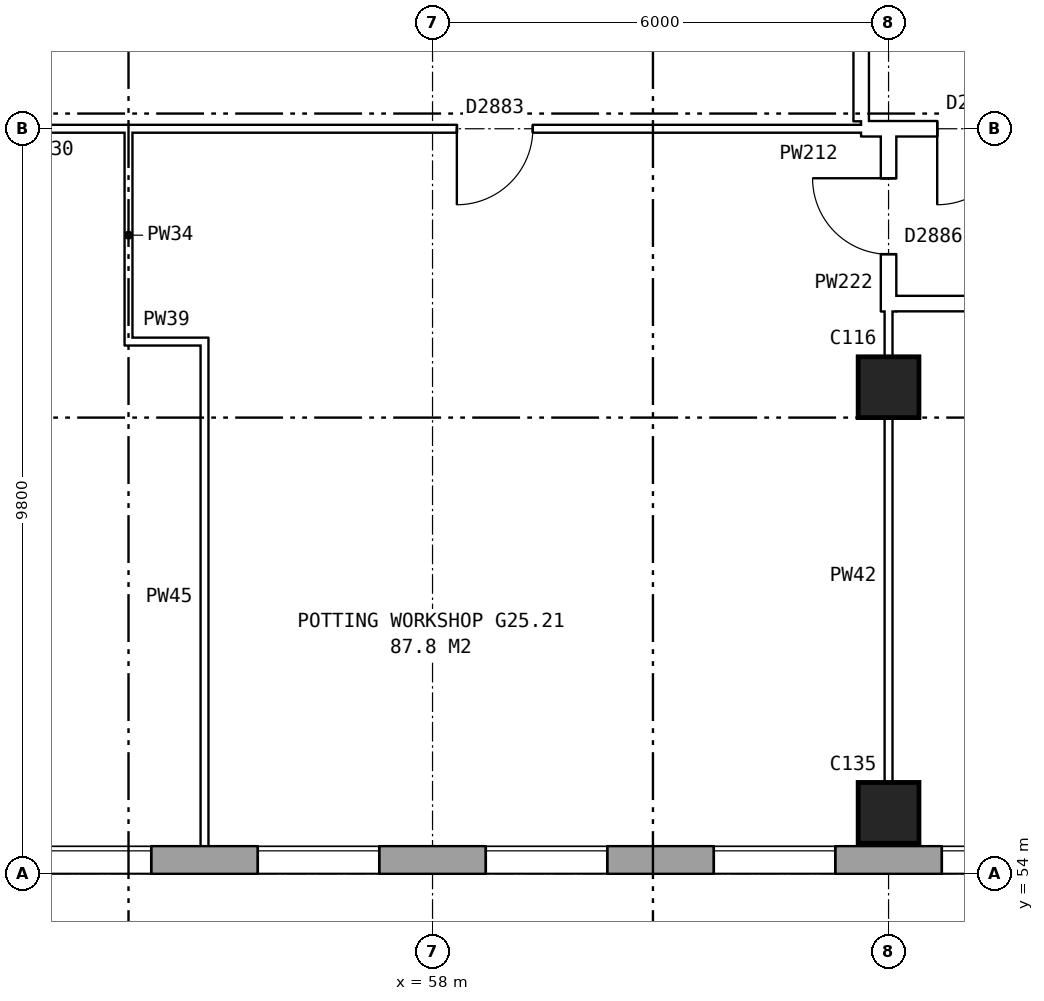
"""IFC4 building model, lengths in metres.
Left out: names, types, materials, properties, quantities, classifications, styles, units other than length and angle.
Written with IfcOpenShell. Run it as: python <this file> out.ifc"""

import sys

from ifc_helpers import new_model, si_unit, direction, frame, frame_2d, origin, origin_2d, place, context, subcontext, project, spatial, rectangle, extrude, element, fill, save


model = new_model("IFC4")
c1 = context("Model", 3, precision=1e-05, world=origin(), true_north=direction((0.0, 1.0)))
c2 = subcontext(c1, "Body", "Model", "MODEL_VIEW")
j1 = project(units=[si_unit("LENGTHUNIT", "METRE"), si_unit("PLANEANGLEUNIT", "RADIAN")], contexts=[c1])
p1 = place(None, origin())
s1 = spatial("IfcSite", under=j1, at=p1, CompositionType="ELEMENT")
p2 = place(p1, origin())
s2 = spatial("IfcBuilding", under=s1, at=p2, CompositionType="ELEMENT")
p3 = place(p2, frame((0.0, 0.0, 90.2)))
s3 = spatial("IfcBuildingStorey", under=s2, at=p3, CompositionType="ELEMENT", Elevation=90.2)
for number, where, z_axis, x_axis in (
    (1, (64.0, 54.8, 0.0), (0.0, 0.0, 1.0), (1.0, 0.0, 0.0)),
    (2, (64.0, 60.4, 0.0), (0.0, 0.0, 1.0), (1.0, 0.0, 0.0)),
):
    element("IfcColumn", number, at=place(p3, frame(where, z_axis=z_axis, x_axis=x_axis)), inside=s3, PredefinedType="COLUMN", context=c2, shape_type="SweptSolid", body=[
        extrude(rectangle(XDim=0.8, YDim=0.8, at=origin_2d()), origin(), (0.0, 0.0, 1.0), 5.6),
    ])
p4 = place(p3, frame((28.075, 54.18, 0.0), z_axis=(0.0, 0.0, 1.0), x_axis=(1.0, 0.0, 0.0)))
e3 = element("IfcWall", 3, at=p4, inside=s3, PredefinedType="STANDARD", context=c2, shape_type="SweptSolid", body=[
    extrude(rectangle(XDim=44.851, YDim=0.36, at=frame_2d((22.425, 0.0))), origin(), (0.0, 0.0, 1.0), 5.6),
])
p5 = place(p4, frame((0.625, 0.0, 0.15)))
e4 = element("IfcOpeningElement", 4, at=p5, cuts=e3, PredefinedType="OPENING", context=c2, shape_type="SweptSolid", body=[
    extrude(rectangle(XDim=1.6, YDim=2.4, at=frame_2d((0.8, 1.2))), frame((0.0, 0.19, 0.0), z_axis=(0.0, -1.0, 0.0), x_axis=(1.0, 0.0, 0.0)), (0.0, 0.0, 1.0), 0.38),
])
p6 = place(p4, frame((3.625, 0.0, 0.15)))
e5 = element("IfcOpeningElement", 5, at=p6, cuts=e3, PredefinedType="OPENING", context=c2, shape_type="SweptSolid", body=[
    extrude(rectangle(XDim=1.6, YDim=2.4, at=frame_2d((0.8, 1.2))), frame((0.0, 0.19, 0.0), z_axis=(0.0, -1.0, 0.0), x_axis=(1.0, 0.0, 0.0)), (0.0, 0.0, 1.0), 0.38),
])
p7 = place(p4, frame((6.625, 0.0, 0.15)))
e6 = element("IfcOpeningElement", 6, at=p7, cuts=e3, PredefinedType="OPENING", context=c2, shape_type="SweptSolid", body=[
    extrude(rectangle(XDim=1.6, YDim=2.4, at=frame_2d((0.8, 1.2))), frame((0.0, 0.19, 0.0), z_axis=(0.0, -1.0, 0.0), x_axis=(1.0, 0.0, 0.0)), (0.0, 0.0, 1.0), 0.38),
])
p8 = place(p4, frame((9.625, 0.0, 0.15)))
e7 = element("IfcOpeningElement", 7, at=p8, cuts=e3, PredefinedType="OPENING", context=c2, shape_type="SweptSolid", body=[
    extrude(rectangle(XDim=1.6, YDim=2.4, at=frame_2d((0.8, 1.2))), frame((0.0, 0.19, 0.0), z_axis=(0.0, -1.0, 0.0), x_axis=(1.0, 0.0, 0.0)), (0.0, 0.0, 1.0), 0.38),
])
p9 = place(p4, frame((12.625, 0.0, 0.15)))
e8 = element("IfcOpeningElement", 8, at=p9, cuts=e3, PredefinedType="OPENING", context=c2, shape_type="SweptSolid", body=[
    extrude(rectangle(XDim=1.6, YDim=2.4, at=frame_2d((0.8, 1.2))), frame((0.0, 0.19, 0.0), z_axis=(0.0, -1.0, 0.0), x_axis=(1.0, 0.0, 0.0)), (0.0, 0.0, 1.0), 0.38),
])
p10 = place(p4, frame((15.625, 0.0, 0.15)))
e9 = element("IfcOpeningElement", 9, at=p10, cuts=e3, PredefinedType="OPENING", context=c2, shape_type="SweptSolid", body=[
    extrude(rectangle(XDim=1.6, YDim=2.4, at=frame_2d((0.8, 1.2))), frame((0.0, 0.19, 0.0), z_axis=(0.0, -1.0, 0.0), x_axis=(1.0, 0.0, 0.0)), (0.0, 0.0, 1.0), 0.38),
])
p11 = place(p4, frame((18.625, 0.0, 0.15)))
e10 = element("IfcOpeningElement", 10, at=p11, cuts=e3, PredefinedType="OPENING", context=c2, shape_type="SweptSolid", body=[
    extrude(rectangle(XDim=1.6, YDim=2.4, at=frame_2d((0.8, 1.2))), frame((0.0, 0.19, 0.0), z_axis=(0.0, -1.0, 0.0), x_axis=(1.0, 0.0, 0.0)), (0.0, 0.0, 1.0), 0.38),
])
p12 = place(p4, frame((21.625, 0.0, 0.15)))
e11 = element("IfcOpeningElement", 11, at=p12, cuts=e3, PredefinedType="OPENING", context=c2, shape_type="SweptSolid", body=[
    extrude(rectangle(XDim=1.6, YDim=2.4, at=frame_2d((0.8, 1.2))), frame((0.0, 0.19, 0.0), z_axis=(0.0, -1.0, 0.0), x_axis=(1.0, 0.0, 0.0)), (0.0, 0.0, 1.0), 0.38),
])
p13 = place(p4, frame((24.625, 0.0, 0.15)))
e12 = element("IfcOpeningElement", 12, at=p13, cuts=e3, PredefinedType="OPENING", context=c2, shape_type="SweptSolid", body=[
    extrude(rectangle(XDim=1.6, YDim=2.4, at=frame_2d((0.8, 1.2))), frame((0.0, 0.19, 0.0), z_axis=(0.0, -1.0, 0.0), x_axis=(1.0, 0.0, 0.0)), (0.0, 0.0, 1.0), 0.38),
])
p14 = place(p4, frame((27.625, 0.0, 0.15)))
e13 = element("IfcOpeningElement", 13, at=p14, cuts=e3, PredefinedType="OPENING", context=c2, shape_type="SweptSolid", body=[
    extrude(rectangle(XDim=1.6, YDim=2.4, at=frame_2d((0.8, 1.2))), frame((0.0, 0.19, 0.0), z_axis=(0.0, -1.0, 0.0), x_axis=(1.0, 0.0, 0.0)), (0.0, 0.0, 1.0), 0.38),
])
p15 = place(p4, frame((30.625, 0.0, 0.15)))
e14 = element("IfcOpeningElement", 14, at=p15, cuts=e3, PredefinedType="OPENING", context=c2, shape_type="SweptSolid", body=[
    extrude(rectangle(XDim=1.6, YDim=2.4, at=frame_2d((0.8, 1.2))), frame((0.0, 0.19, 0.0), z_axis=(0.0, -1.0, 0.0), x_axis=(1.0, 0.0, 0.0)), (0.0, 0.0, 1.0), 0.38),
])
p16 = place(p4, frame((33.625, 0.0, 0.15)))
e15 = element("IfcOpeningElement", 15, at=p16, cuts=e3, PredefinedType="OPENING", context=c2, shape_type="SweptSolid", body=[
    extrude(rectangle(XDim=1.6, YDim=2.4, at=frame_2d((0.8, 1.2))), frame((0.0, 0.19, 0.0), z_axis=(0.0, -1.0, 0.0), x_axis=(1.0, 0.0, 0.0)), (0.0, 0.0, 1.0), 0.38),
])
p17 = place(p4, frame((36.625, 0.0, 0.15)))
e16 = element("IfcOpeningElement", 16, at=p17, cuts=e3, PredefinedType="OPENING", context=c2, shape_type="SweptSolid", body=[
    extrude(rectangle(XDim=1.6, YDim=2.4, at=frame_2d((0.8, 1.2))), frame((0.0, 0.19, 0.0), z_axis=(0.0, -1.0, 0.0), x_axis=(1.0, 0.0, 0.0)), (0.0, 0.0, 1.0), 0.38),
])
p18 = place(p4, frame((39.625, 0.0, 0.15)))
e17 = element("IfcOpeningElement", 17, at=p18, cuts=e3, PredefinedType="OPENING", context=c2, shape_type="SweptSolid", body=[
    extrude(rectangle(XDim=1.6, YDim=2.4, at=frame_2d((0.8, 1.2))), frame((0.0, 0.19, 0.0), z_axis=(0.0, -1.0, 0.0), x_axis=(1.0, 0.0, 0.0)), (0.0, 0.0, 1.0), 0.38),
])
p19 = place(p4, frame((42.625, 0.0, 0.15)))
e18 = element("IfcOpeningElement", 18, at=p19, cuts=e3, PredefinedType="OPENING", context=c2, shape_type="SweptSolid", body=[
    extrude(rectangle(XDim=1.6, YDim=2.4, at=frame_2d((0.8, 1.2))), frame((0.0, 0.19, 0.0), z_axis=(0.0, -1.0, 0.0), x_axis=(1.0, 0.0, 0.0)), (0.0, 0.0, 1.0), 0.38),
])
p20 = place(p3, frame((63.64, 63.9, 0.0), z_axis=(0.0, 0.0, 1.0), x_axis=(0.0, 1.0, 0.0)))
e19 = element("IfcWall", 19, at=p20, inside=s3, PredefinedType="PARTITIONING", context=c2, shape_type="SweptSolid", body=[
    extrude(rectangle(XDim=12.2, YDim=0.2, at=frame_2d((6.1, 0.0))), origin(), (0.0, 0.0, 1.0), 5.6),
])
p21 = place(p20, frame((5.1, 0.0, 0.0)))
e20 = element("IfcOpeningElement", 20, at=p21, cuts=e19, PredefinedType="OPENING", context=c2, shape_type="SweptSolid", body=[
    extrude(rectangle(XDim=2.0, YDim=2.1, at=frame_2d((1.0, 1.05))), frame((0.0, 0.11, 0.0), z_axis=(0.0, -1.0, 0.0), x_axis=(1.0, 0.0, 0.0)), (0.0, 0.0, 1.0), 0.22),
])
p22 = place(p3, frame((53.95, 61.0, 0.0), z_axis=(0.0, 0.0, 1.0), x_axis=(1.0, 0.0, 0.0)))
e21 = element("IfcWall", 21, at=p22, inside=s3, PredefinedType="PARTITIONING", context=c2, shape_type="SweptSolid", body=[
    extrude(rectangle(XDim=1.1, YDim=0.1, at=frame_2d((0.55, 0.0))), origin(), (0.0, 0.0, 1.0), 5.6),
])
p23 = place(p3, frame((63.9, 61.5, 0.0), z_axis=(0.0, 0.0, 1.0), x_axis=(1.0, 0.0, 0.0)))
e22 = element("IfcWall", 22, at=p23, inside=s3, PredefinedType="PARTITIONING", context=c2, shape_type="SweptSolid", body=[
    extrude(rectangle(XDim=11.86, YDim=0.2, at=frame_2d((5.93, 0.0))), origin(), (0.0, 0.0, 1.0), 5.6),
])
p24 = place(p23, frame((2.6, 0.0, 0.0)))
e23 = element("IfcOpeningElement", 23, at=p24, cuts=e22, PredefinedType="OPENING", context=c2, shape_type="SweptSolid", body=[
    extrude(rectangle(XDim=1.0, YDim=2.1, at=frame_2d((0.5, 1.05))), frame((0.0, 0.11, 0.0), z_axis=(0.0, -1.0, 0.0), x_axis=(1.0, 0.0, 0.0)), (0.0, 0.0, 1.0), 0.22),
])
p25 = place(p23, frame((8.42, 0.0, 0.0)))
e24 = element("IfcOpeningElement", 24, at=p25, cuts=e22, PredefinedType="OPENING", context=c2, shape_type="SweptSolid", body=[
    extrude(rectangle(XDim=1.0, YDim=2.1, at=frame_2d((0.5, 1.05))), frame((0.0, 0.11, 0.0), z_axis=(0.0, -1.0, 0.0), x_axis=(1.0, 0.0, 0.0)), (0.0, 0.0, 1.0), 0.22),
])
p26 = place(p3, frame((63.64, 63.8, 0.0), z_axis=(0.0, 0.0, 1.0), x_axis=(1.0, 0.0, 0.0)))
e25 = element("IfcWall", 25, at=p26, inside=s3, PredefinedType="PARTITIONING", context=c2, shape_type="SweptSolid", body=[
    extrude(rectangle(XDim=3.0, YDim=0.2, at=frame_2d((1.5, 0.0))), origin(), (0.0, 0.0, 1.0), 5.6),
])
p27 = place(p26, frame((1.0, 0.0, 0.0)))
e26 = element("IfcOpeningElement", 26, at=p27, cuts=e25, PredefinedType="OPENING", context=c2, shape_type="SweptSolid", body=[
    extrude(rectangle(XDim=1.0, YDim=2.1, at=frame_2d((0.5, 1.05))), frame((0.0, 0.11, 0.0), z_axis=(0.0, -1.0, 0.0), x_axis=(1.0, 0.0, 0.0)), (0.0, 0.0, 1.0), 0.22),
])
p28 = place(p3, frame((44.26, 63.8, 0.0), z_axis=(0.0, 0.0, 1.0), x_axis=(1.0, 0.0, 0.0)))
e27 = element("IfcWall", 27, at=p28, inside=s3, PredefinedType="PARTITIONING", context=c2, shape_type="SweptSolid", body=[
    extrude(rectangle(XDim=19.38, YDim=0.1, at=frame_2d((9.69, 0.0))), origin(), (0.0, 0.0, 1.0), 5.6),
])
p29 = place(p28, frame((4.42, 0.0, 0.0)))
e28 = element("IfcOpeningElement", 28, at=p29, cuts=e27, PredefinedType="OPENING", context=c2, shape_type="SweptSolid", body=[
    extrude(rectangle(XDim=1.0, YDim=2.1, at=frame_2d((0.5, 1.05))), frame((0.0, 0.06, 0.0), z_axis=(0.0, -1.0, 0.0), x_axis=(1.0, 0.0, 0.0)), (0.0, 0.0, 1.0), 0.12),
])
p30 = place(p28, frame((14.06, 0.0, 0.0)))
e29 = element("IfcOpeningElement", 29, at=p30, cuts=e27, PredefinedType="OPENING", context=c2, shape_type="SweptSolid", body=[
    extrude(rectangle(XDim=1.0, YDim=2.1, at=frame_2d((0.5, 1.05))), frame((0.0, 0.06, 0.0), z_axis=(0.0, -1.0, 0.0), x_axis=(1.0, 0.0, 0.0)), (0.0, 0.0, 1.0), 0.12),
])
p31 = place(p3, frame((54.0, 60.95, 0.0), z_axis=(0.0, 0.0, 1.0), x_axis=(0.0, 1.0, 0.0)))
e30 = element("IfcWall", 30, at=p31, inside=s3, PredefinedType="PARTITIONING", context=c2, shape_type="SweptSolid", body=[
    extrude(rectangle(XDim=2.9, YDim=0.1, at=frame_2d((1.45, 0.0))), origin(), (0.0, 0.0, 1.0), 5.6),
])
p32 = place(p3, frame((55.0, 54.24, 0.0), z_axis=(0.0, 0.0, 1.0), x_axis=(0.0, 1.0, 0.0)))
e31 = element("IfcWall", 31, at=p32, inside=s3, PredefinedType="PARTITIONING", context=c2, shape_type="SweptSolid", body=[
    extrude(rectangle(XDim=6.81, YDim=0.1, at=frame_2d((3.405, 0.0))), origin(), (0.0, 0.0, 1.0), 5.6),
])
p33 = place(p3, frame((64.0, 61.398, 0.0), z_axis=(0.0, 0.0, 1.0), x_axis=(0.0, 1.0, 0.0)))
e32 = element("IfcWall", 32, at=p33, inside=s3, PredefinedType="PARTITIONING", context=c2, shape_type="SweptSolid", body=[
    extrude(rectangle(XDim=2.502, YDim=0.2, at=frame_2d((1.251, 0.0))), origin(), (0.0, 0.0, 1.0), 5.6),
])
p34 = place(p33, frame((0.751, 0.0, 0.0)))
e33 = element("IfcOpeningElement", 33, at=p34, cuts=e32, PredefinedType="OPENING", context=c2, shape_type="SweptSolid", body=[
    extrude(rectangle(XDim=1.0, YDim=2.1, at=frame_2d((0.5, 1.05))), frame((0.0, 0.11, 0.0), z_axis=(0.0, -1.0, 0.0), x_axis=(1.0, 0.0, 0.0)), (0.0, 0.0, 1.0), 0.22),
])
p35 = place(p3, frame((64.0, 54.24, 0.0), z_axis=(0.0, 0.0, 1.0), x_axis=(0.0, 1.0, 0.0)))
e34 = element("IfcWall", 34, at=p35, inside=s3, PredefinedType="PARTITIONING", context=c2, shape_type="SweptSolid", body=[
    extrude(rectangle(XDim=7.362, YDim=0.1, at=frame_2d((3.681, 0.0))), origin(), (0.0, 0.0, 1.0), 5.6),
])
p36 = place(p13, origin())
e35 = element("IfcWindow", 35, at=p36, inside=s3, PartitioningType="SINGLE_PANEL", PredefinedType="WINDOW", context=c2, shape_type="SweptSolid", body=[
    extrude(rectangle(XDim=1.6, YDim=2.4, at=frame_2d((0.8, 1.2))), frame((0.0, 0.15, 0.0), z_axis=(0.0, -1.0, 0.0), x_axis=(1.0, 0.0, 0.0)), (0.0, 0.0, 1.0), 0.06),
])
fill(e12, e35)
p37 = place(p14, origin())
e36 = element("IfcWindow", 36, at=p37, inside=s3, PartitioningType="SINGLE_PANEL", PredefinedType="WINDOW", context=c2, shape_type="SweptSolid", body=[
    extrude(rectangle(XDim=1.6, YDim=2.4, at=frame_2d((0.8, 1.2))), frame((0.0, 0.15, 0.0), z_axis=(0.0, -1.0, 0.0), x_axis=(1.0, 0.0, 0.0)), (0.0, 0.0, 1.0), 0.06),
])
fill(e13, e36)
p38 = place(p15, origin())
e37 = element("IfcWindow", 37, at=p38, inside=s3, PartitioningType="SINGLE_PANEL", PredefinedType="WINDOW", context=c2, shape_type="SweptSolid", body=[
    extrude(rectangle(XDim=1.6, YDim=2.4, at=frame_2d((0.8, 1.2))), frame((0.0, 0.15, 0.0), z_axis=(0.0, -1.0, 0.0), x_axis=(1.0, 0.0, 0.0)), (0.0, 0.0, 1.0), 0.06),
])
fill(e14, e37)
p39 = place(p16, origin())
e38 = element("IfcWindow", 38, at=p39, inside=s3, PartitioningType="SINGLE_PANEL", PredefinedType="WINDOW", context=c2, shape_type="SweptSolid", body=[
    extrude(rectangle(XDim=1.6, YDim=2.4, at=frame_2d((0.8, 1.2))), frame((0.0, 0.15, 0.0), z_axis=(0.0, -1.0, 0.0), x_axis=(1.0, 0.0, 0.0)), (0.0, 0.0, 1.0), 0.06),
])
fill(e15, e38)
p40 = place(p17, origin())
e39 = element("IfcWindow", 39, at=p40, inside=s3, PartitioningType="SINGLE_PANEL", PredefinedType="WINDOW", context=c2, shape_type="SweptSolid", body=[
    extrude(rectangle(XDim=1.6, YDim=2.4, at=frame_2d((0.8, 1.2))), frame((0.0, 0.15, 0.0), z_axis=(0.0, -1.0, 0.0), x_axis=(1.0, 0.0, 0.0)), (0.0, 0.0, 1.0), 0.06),
])
fill(e16, e39)
p41 = place(p27, frame((1.0, 0.0, 0.0), z_axis=(0.0, 0.0, 1.0), x_axis=(-1.0, 0.0, 0.0)))
e40 = element("IfcDoor", 40, at=p41, inside=s3, OperationType="SINGLE_SWING_RIGHT", PredefinedType="DOOR", context=c2, shape_type="SweptSolid", body=[
    extrude(rectangle(XDim=1.0, YDim=2.1, at=frame_2d((0.5, 1.05))), frame((0.0, 0.025, 0.0), z_axis=(0.0, -1.0, 0.0), x_axis=(1.0, 0.0, 0.0)), (0.0, 0.0, 1.0), 0.05),
])
fill(e26, e40)
p42 = place(p30, frame((1.0, 0.0, 0.0), z_axis=(0.0, 0.0, 1.0), x_axis=(-1.0, 0.0, 0.0)))
e41 = element("IfcDoor", 41, at=p42, inside=s3, OperationType="SINGLE_SWING_RIGHT", PredefinedType="DOOR", context=c2, shape_type="SweptSolid", body=[
    extrude(rectangle(XDim=1.0, YDim=2.1, at=frame_2d((0.5, 1.05))), frame((0.0, 0.025, 0.0), z_axis=(0.0, -1.0, 0.0), x_axis=(1.0, 0.0, 0.0)), (0.0, 0.0, 1.0), 0.05),
])
fill(e29, e41)
p43 = place(p34, origin())
e42 = element("IfcDoor", 42, at=p43, inside=s3, OperationType="SINGLE_SWING_RIGHT", PredefinedType="DOOR", context=c2, shape_type="SweptSolid", body=[
    extrude(rectangle(XDim=1.0, YDim=2.1, at=frame_2d((0.5, 1.05))), frame((0.0, 0.025, 0.0), z_axis=(0.0, -1.0, 0.0), x_axis=(1.0, 0.0, 0.0)), (0.0, 0.0, 1.0), 0.05),
])
fill(e33, e42)
save(model, sys.argv[1])
